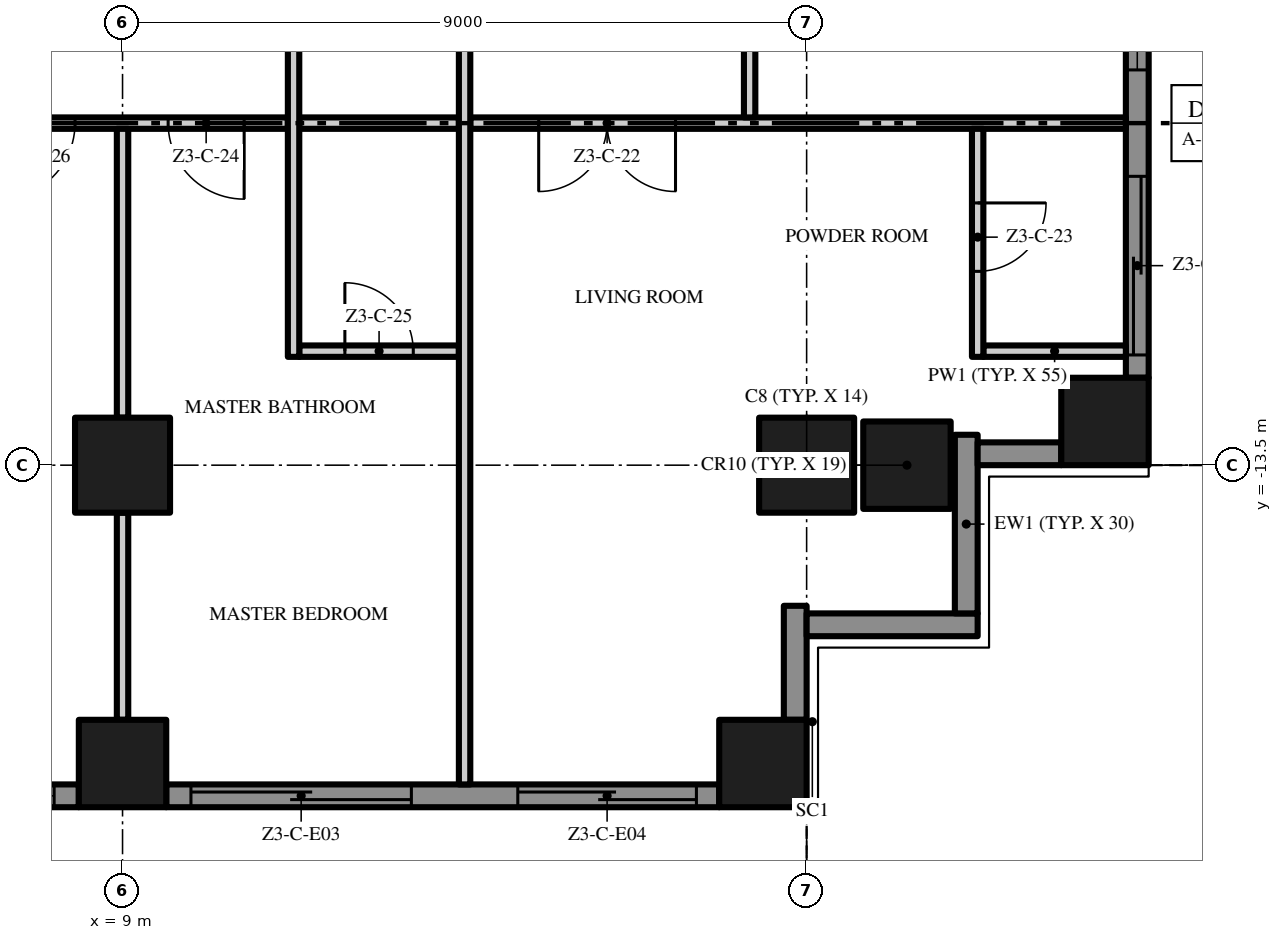
"""IFC4 building model, lengths in metres.
Left out: names, types, materials, properties, quantities, classifications, styles, units other than length and angle.
Written with IfcOpenShell. Run it as: python <this file> out.ifc"""

import sys

from ifc_helpers import new_model, si_unit, direction, frame, frame_2d, origin, origin_2d, place, context, subcontext, project, spatial, polyline, rectangle, outline, extrude, element, fill, save


model = new_model("IFC4")
c1 = context("Model", 3, precision=1e-05, world=origin(), true_north=direction((0.0, 1.0)))
c2 = subcontext(c1, "Body", "Model", "MODEL_VIEW")
j1 = project(units=[si_unit("LENGTHUNIT", "METRE"), si_unit("PLANEANGLEUNIT", "RADIAN")], contexts=[c1])
p1 = place(None, origin())
s1 = spatial("IfcSite", under=j1, at=p1, CompositionType="ELEMENT")
p2 = place(p1, origin())
s2 = spatial("IfcBuilding", under=s1, at=p2, CompositionType="ELEMENT")
p3 = place(p2, frame((0.0, 0.0, 147.8)))
s3 = spatial("IfcBuildingStorey", under=s2, at=p3, CompositionType="ELEMENT", Elevation=147.8)
p4 = place(p3, frame((18.0, -13.5, 0.0), z_axis=(0.0, 0.0, 1.0), x_axis=(1.0, 0.0, 0.0)))
e1 = element("IfcColumn", 1, at=p4, inside=s3, PredefinedType="COLUMN", context=c2, shape_type="SweptSolid", body=[
    extrude(rectangle(XDim=1.25, YDim=1.25, at=origin_2d()), origin(), (0.0, 0.0, 1.0), 3.5),
])
for number, where, z_axis, x_axis in (
    (2, (17.425, -17.425, 0.0), (0.0, 0.0, 1.0), (1.0, 0.0, 0.0)),
    (3, (21.925, -12.925, 0.0), (0.0, 0.0, 1.0), (1.0, 0.0, 0.0)),
    (4, (19.32, -13.5, 0.0), (0.0, 0.0, 1.0), (1.0, 0.0, 0.0)),
):
    element("IfcColumn", number, at=place(p3, frame(where, z_axis=z_axis, x_axis=x_axis)), inside=s3, PredefinedType="COLUMN", context=c2, shape_type="SweptSolid", body=[
        extrude(rectangle(XDim=1.15, YDim=1.15, at=origin_2d()), origin(), (0.0, 0.0, 1.0), 3.5),
    ])
p5 = place(p3, frame((9.0, -13.5, 0.0), z_axis=(0.0, 0.0, 1.0), x_axis=(1.0, 0.0, 0.0)))
e5 = element("IfcColumn", 5, at=p5, inside=s3, PredefinedType="COLUMN", context=c2, shape_type="SweptSolid", body=[
    extrude(rectangle(XDim=1.25, YDim=1.25, at=origin_2d()), origin(), (0.0, 0.0, 1.0), 3.5),
])
p6 = place(p3, frame((9.0, -17.425, 0.0), z_axis=(0.0, 0.0, 1.0), x_axis=(1.0, 0.0, 0.0)))
e6 = element("IfcColumn", 6, at=p6, inside=s3, PredefinedType="COLUMN", context=c2, shape_type="SweptSolid", body=[
    extrude(rectangle(XDim=1.15, YDim=1.15, at=origin_2d()), origin(), (0.0, 0.0, 1.0), 3.5),
])
p7 = place(p3, frame((8.425, -17.85, 0.0), z_axis=(0.0, 0.0, 1.0), x_axis=(-1.0, 0.0, 0.0)))
e7 = element("IfcWall", 7, at=p7, inside=s3, PredefinedType="SOLIDWALL", context=c2, shape_type="SweptSolid", body=[
    extrude(rectangle(XDim=7.85, YDim=0.3, at=frame_2d((3.925, 0.0))), origin(), (0.0, 0.0, 1.0), 3.5),
])
p8 = place(p7, frame((4.625, 0.0, 0.45)))
e8 = element("IfcOpeningElement", 8, at=p8, cuts=e7, PredefinedType="OPENING", context=c2, shape_type="SweptSolid", body=[
    extrude(rectangle(XDim=2.9, YDim=2.65, at=frame_2d((1.45, 1.325))), frame((0.0, 0.16, 0.0), z_axis=(0.0, -1.0, 0.0), x_axis=(1.0, 0.0, 0.0)), (0.0, 0.0, 1.0), 0.32),
])
p9 = place(p7, frame((0.325, 0.0, 0.45)))
e9 = element("IfcOpeningElement", 9, at=p9, cuts=e7, PredefinedType="OPENING", context=c2, shape_type="SweptSolid", body=[
    extrude(rectangle(XDim=2.9, YDim=2.65, at=frame_2d((1.45, 1.325))), frame((0.0, 0.16, 0.0), z_axis=(0.0, -1.0, 0.0), x_axis=(1.0, 0.0, 0.0)), (0.0, 0.0, 1.0), 0.32),
])
p10 = place(p3, frame((16.85, -17.85, 0.0), z_axis=(0.0, 0.0, 1.0), x_axis=(-1.0, 0.0, 0.0)))
e10 = element("IfcWall", 10, at=p10, inside=s3, PredefinedType="SOLIDWALL", context=c2, shape_type="SweptSolid", body=[
    extrude(rectangle(XDim=7.275, YDim=0.3, at=frame_2d((3.638, 0.0))), origin(), (0.0, 0.0, 1.0), 3.5),
])
p11 = place(p10, frame((4.05, 0.0, 0.0)))
e11 = element("IfcOpeningElement", 11, at=p11, cuts=e10, PredefinedType="OPENING", context=c2, shape_type="SweptSolid", body=[
    extrude(rectangle(XDim=2.9, YDim=2.4, at=frame_2d((1.45, 1.2))), frame((0.0, 0.16, 0.0), z_axis=(0.0, -1.0, 0.0), x_axis=(1.0, 0.0, 0.0)), (0.0, 0.0, 1.0), 0.32),
])
p12 = place(p10, frame((0.3, 0.0, 0.0)))
e12 = element("IfcOpeningElement", 12, at=p12, cuts=e10, PredefinedType="OPENING", context=c2, shape_type="SweptSolid", body=[
    extrude(rectangle(XDim=2.35, YDim=2.4, at=frame_2d((1.175, 1.2))), frame((0.0, 0.16, 0.0), z_axis=(0.0, -1.0, 0.0), x_axis=(1.0, 0.0, 0.0)), (0.0, 0.0, 1.0), 0.32),
])
p13 = place(p3, frame((17.85, -15.35, 0.0), z_axis=(0.0, 0.0, 1.0), x_axis=(0.0, -1.0, 0.0)))
e13 = element("IfcWall", 13, at=p13, inside=s3, PredefinedType="SOLIDWALL", context=c2, shape_type="SweptSolid", body=[
    extrude(rectangle(XDim=1.5, YDim=0.3, at=frame_2d((0.75, 0.0))), origin(), (0.0, 0.0, 1.0), 3.5),
])
p14 = place(p3, frame((20.25, -15.6, 0.0), z_axis=(0.0, 0.0, 1.0), x_axis=(-1.0, 0.0, 0.0)))
e14 = element("IfcWall", 14, at=p14, inside=s3, PredefinedType="SOLIDWALL", context=c2, shape_type="SweptSolid", body=[
    extrude(rectangle(XDim=2.25, YDim=0.3, at=frame_2d((1.125, 0.0))), origin(), (0.0, 0.0, 1.0), 3.5),
])
p15 = place(p3, frame((20.1, -13.1, 0.0), z_axis=(0.0, 0.0, 1.0), x_axis=(0.0, -1.0, 0.0)))
e15 = element("IfcWall", 15, at=p15, inside=s3, PredefinedType="SOLIDWALL", context=c2, shape_type="SweptSolid", body=[
    extrude(rectangle(XDim=2.35, YDim=0.3, at=frame_2d((1.175, 0.0))), origin(), (0.0, 0.0, 1.0), 3.5),
])
p16 = place(p3, frame((21.35, -13.35, 0.0), z_axis=(0.0, 0.0, 1.0), x_axis=(-1.0, 0.0, 0.0)))
e16 = element("IfcWall", 16, at=p16, inside=s3, PredefinedType="SOLIDWALL", context=c2, shape_type="SweptSolid", body=[
    extrude(rectangle(XDim=1.1, YDim=0.3, at=frame_2d((0.55, 0.0))), origin(), (0.0, 0.0, 1.0), 3.5),
])
p17 = place(p3, frame((22.35, -5.075, 0.0), z_axis=(0.0, 0.0, 1.0), x_axis=(0.0, -1.0, 0.0)))
e17 = element("IfcWall", 17, at=p17, inside=s3, PredefinedType="SOLIDWALL", context=c2, shape_type="SweptSolid", body=[
    extrude(rectangle(XDim=7.275, YDim=0.3, at=frame_2d((3.638, 0.0))), origin(), (0.0, 0.0, 1.0), 3.5),
])
p18 = place(p17, frame((4.625, 0.0, 0.0)))
e18 = element("IfcOpeningElement", 18, at=p18, cuts=e17, PredefinedType="OPENING", context=c2, shape_type="SweptSolid", body=[
    extrude(rectangle(XDim=2.35, YDim=2.4, at=frame_2d((1.175, 1.2))), frame((0.0, 0.16, 0.0), z_axis=(0.0, -1.0, 0.0), x_axis=(1.0, 0.0, 0.0)), (0.0, 0.0, 1.0), 0.32),
])
p19 = place(p17, frame((0.325, 0.0, 0.45)))
e19 = element("IfcOpeningElement", 19, at=p19, cuts=e17, PredefinedType="OPENING", context=c2, shape_type="SweptSolid", body=[
    extrude(rectangle(XDim=2.9, YDim=2.65, at=frame_2d((1.45, 1.325))), frame((0.0, 0.16, 0.0), z_axis=(0.0, -1.0, 0.0), x_axis=(1.0, 0.0, 0.0)), (0.0, 0.0, 1.0), 0.32),
])
p20 = place(p3, origin())
e20 = element("IfcWall", 20, at=p20, inside=s3, PredefinedType="USERDEFINED", context=c2, shape_type="SweptSolid", body=[
    extrude(outline(polyline([(-18.0, -20.649), (-16.5, -20.985), (-16.125, -21.0), (-15.0, -20.869), (-13.5, -20.345), (-12.0, -19.612), (-10.5, -18.951), (-9.0, -18.615), (-8.625, -18.6), (-7.5, -18.731), (-6.0, -19.255), (-4.5, -19.988), (-3.0, -20.649), (-1.5, -20.985), (-1.125, -21.0), (0.0, -20.869), (1.5, -20.345), (3.0, -19.612), (4.5, -18.951), (6.0, -18.615), (6.375, -18.6), (7.5, -18.731), (9.0, -19.255), (10.5, -19.988), (12.0, -20.649), (13.5, -20.985), (13.875, -21.0), (15.0, -20.869), (16.5, -20.345), (18.0, -19.612), (17.89, -19.388), (16.404, -20.114), (14.944, -20.624), (13.865, -20.749), (13.533, -20.736), (12.079, -20.41), (10.605, -19.761), (9.096, -19.024), (7.556, -18.486), (6.385, -18.349), (5.967, -18.366), (4.421, -18.713), (2.895, -19.385), (1.404, -20.114), (-0.056, -20.624), (-1.135, -20.749), (-1.467, -20.736), (-2.921, -20.41), (-4.395, -19.761), (-5.904, -19.024), (-7.444, -18.486), (-8.615, -18.349), (-9.033, -18.366), (-10.579, -18.713), (-12.105, -19.385), (-13.596, -20.114), (-15.056, -20.624), (-16.135, -20.749), (-16.467, -20.736), (-17.945, -20.405), (-18.0, -20.649)])), origin(), (0.0, 0.0, 1.0), 0.9),
])
p21 = place(p3, origin())
e21 = element("IfcWall", 21, at=p21, inside=s3, PredefinedType="USERDEFINED", context=c2, shape_type="SweptSolid", body=[
    extrude(outline(polyline([(25.149, -13.5), (25.485, -12.0), (25.5, -11.625), (25.369, -10.5), (24.845, -9.0), (24.112, -7.5), (23.451, -6.0), (23.115, -4.5), (23.1, -4.125), (23.231, -3.0), (23.755, -1.5), (24.488, 0.0), (25.149, 1.5), (25.485, 3.0), (25.5, 3.375), (25.369, 4.5), (24.845, 6.0), (24.112, 7.5), (23.451, 9.0), (23.115, 10.5), (23.1, 10.875), (23.231, 12.0), (23.755, 13.5), (24.488, 15.0), (25.149, 16.5), (25.485, 18.0), (25.241, 18.055), (24.91, 16.579), (24.261, 15.105), (23.524, 13.596), (22.986, 12.056), (22.849, 10.885), (22.866, 10.467), (23.213, 8.921), (23.885, 7.395), (24.614, 5.904), (25.124, 4.444), (25.249, 3.365), (25.236, 3.033), (24.91, 1.579), (24.261, 0.105), (23.524, -1.404), (22.986, -2.944), (22.849, -4.115), (22.866, -4.533), (23.213, -6.079), (23.885, -7.605), (24.614, -9.096), (25.124, -10.556), (25.249, -11.635), (25.236, -11.967), (24.905, -13.445), (25.149, -13.5)])), origin(), (0.0, 0.0, 1.0), 0.9),
])
p22 = place(p3, frame((11.325, -12.0, 0.0), z_axis=(0.0, 0.0, 1.0), x_axis=(1.0, 0.0, 0.0)))
e22 = element("IfcWall", 22, at=p22, inside=s3, PredefinedType="PARTITIONING", context=c2, shape_type="SweptSolid", body=[
    extrude(rectangle(XDim=2.1, YDim=0.15, at=frame_2d((1.05, 0.0))), origin(), (0.0, 0.0, 1.0), 3.5),
])
p23 = place(p22, frame((0.6, 0.0, 0.0)))
e23 = element("IfcOpeningElement", 23, at=p23, cuts=e22, PredefinedType="OPENING", context=c2, shape_type="SweptSolid", body=[
    extrude(rectangle(XDim=0.9, YDim=2.1, at=frame_2d((0.45, 1.05))), frame((0.0, 0.085, 0.0), z_axis=(0.0, -1.0, 0.0), x_axis=(1.0, 0.0, 0.0)), (0.0, 0.0, 1.0), 0.17),
])
p24 = place(p3, frame((20.325, -12.0, 0.0), z_axis=(0.0, 0.0, 1.0), x_axis=(1.0, 0.0, 0.0)))
e24 = element("IfcWall", 24, at=p24, inside=s3, PredefinedType="PARTITIONING", context=c2, shape_type="SweptSolid", body=[
    extrude(rectangle(XDim=1.875, YDim=0.15, at=frame_2d((0.938, 0.0))), origin(), (0.0, 0.0, 1.0), 3.5),
])
p25 = place(p3, frame((11.175, -9.0, 0.0), z_axis=(0.0, 0.0, 1.0), x_axis=(-1.0, 0.0, 0.0)))
e25 = element("IfcWall", 25, at=p25, inside=s3, PredefinedType="PARTITIONING", context=c2, shape_type="SweptSolid", body=[
    extrude(rectangle(XDim=4.35, YDim=0.15, at=frame_2d((2.175, 0.0))), origin(), (0.0, 0.0, 1.0), 3.5),
])
p26 = place(p25, frame((0.575, 0.0, 0.0)))
e26 = element("IfcOpeningElement", 26, at=p26, cuts=e25, PredefinedType="OPENING", context=c2, shape_type="SweptSolid", body=[
    extrude(rectangle(XDim=1.0, YDim=2.4, at=frame_2d((0.5, 1.2))), frame((0.0, 0.085, 0.0), z_axis=(0.0, -1.0, 0.0), x_axis=(1.0, 0.0, 0.0)), (0.0, 0.0, 1.0), 0.17),
])
p27 = place(p25, frame((2.8, 0.0, 0.0)))
e27 = element("IfcOpeningElement", 27, at=p27, cuts=e25, PredefinedType="OPENING", context=c2, shape_type="SweptSolid", body=[
    extrude(rectangle(XDim=1.0, YDim=2.4, at=frame_2d((0.5, 1.2))), frame((0.0, 0.085, 0.0), z_axis=(0.0, -1.0, 0.0), x_axis=(1.0, 0.0, 0.0)), (0.0, 0.0, 1.0), 0.17),
])
p28 = place(p3, frame((11.325, -9.0, 0.0), z_axis=(0.0, 0.0, 1.0), x_axis=(1.0, 0.0, 0.0)))
e28 = element("IfcWall", 28, at=p28, inside=s3, PredefinedType="PARTITIONING", context=c2, shape_type="SweptSolid", body=[
    extrude(rectangle(XDim=2.1, YDim=0.15, at=frame_2d((1.05, 0.0))), origin(), (0.0, 0.0, 1.0), 3.5),
])
p29 = place(p3, frame((22.2, -9.0, 0.0), z_axis=(0.0, 0.0, 1.0), x_axis=(-1.0, 0.0, 0.0)))
e29 = element("IfcWall", 29, at=p29, inside=s3, PredefinedType="PARTITIONING", context=c2, shape_type="SweptSolid", body=[
    extrude(rectangle(XDim=8.625, YDim=0.15, at=frame_2d((4.312, 0.0))), origin(), (0.0, 0.0, 1.0), 3.5),
])
p30 = place(p29, frame((5.925, 0.0, 0.0)))
e30 = element("IfcOpeningElement", 30, at=p30, cuts=e29, PredefinedType="OPENING", context=c2, shape_type="SweptSolid", body=[
    extrude(rectangle(XDim=1.8, YDim=2.4, at=frame_2d((0.9, 1.2))), frame((0.0, 0.085, 0.0), z_axis=(0.0, -1.0, 0.0), x_axis=(1.0, 0.0, 0.0)), (0.0, 0.0, 1.0), 0.17),
])
p31 = place(p3, frame((9.0, -16.85, 0.0), z_axis=(0.0, 0.0, 1.0), x_axis=(0.0, 1.0, 0.0)))
e31 = element("IfcWall", 31, at=p31, inside=s3, PredefinedType="PARTITIONING", context=c2, shape_type="SweptSolid", body=[
    extrude(rectangle(XDim=2.725, YDim=0.15, at=frame_2d((1.363, 0.0))), origin(), (0.0, 0.0, 1.0), 3.5),
])
p32 = place(p3, frame((9.0, -12.875, 0.0), z_axis=(0.0, 0.0, 1.0), x_axis=(0.0, 1.0, 0.0)))
e32 = element("IfcWall", 32, at=p32, inside=s3, PredefinedType="PARTITIONING", context=c2, shape_type="SweptSolid", body=[
    extrude(rectangle(XDim=3.8, YDim=0.15, at=frame_2d((1.9, 0.0))), origin(), (0.0, 0.0, 1.0), 3.5),
])
p33 = place(p3, frame((11.25, -12.075, 0.0), z_axis=(0.0, 0.0, 1.0), x_axis=(0.0, 1.0, 0.0)))
e33 = element("IfcWall", 33, at=p33, inside=s3, PredefinedType="PARTITIONING", context=c2, shape_type="SweptSolid", body=[
    extrude(rectangle(XDim=7.65, YDim=0.15, at=frame_2d((3.825, 0.0))), origin(), (0.0, 0.0, 1.0), 3.5),
])
p34 = place(p3, frame((13.5, -17.7, 0.0), z_axis=(0.0, 0.0, 1.0), x_axis=(0.0, 1.0, 0.0)))
e34 = element("IfcWall", 34, at=p34, inside=s3, PredefinedType="PARTITIONING", context=c2, shape_type="SweptSolid", body=[
    extrude(rectangle(XDim=13.275, YDim=0.15, at=frame_2d((6.638, 0.0))), origin(), (0.0, 0.0, 1.0), 3.5),
])
p35 = place(p34, frame((10.5, 0.0, 0.0)))
e35 = element("IfcOpeningElement", 35, at=p35, cuts=e34, PredefinedType="OPENING", context=c2, shape_type="SweptSolid", body=[
    extrude(rectangle(XDim=0.9, YDim=2.1, at=frame_2d((0.45, 1.05))), frame((0.0, 0.085, 0.0), z_axis=(0.0, -1.0, 0.0), x_axis=(1.0, 0.0, 0.0)), (0.0, 0.0, 1.0), 0.17),
])
p36 = place(p3, frame((17.25, -8.925, 0.0), z_axis=(0.0, 0.0, 1.0), x_axis=(0.0, 1.0, 0.0)))
e36 = element("IfcWall", 36, at=p36, inside=s3, PredefinedType="PARTITIONING", context=c2, shape_type="SweptSolid", body=[
    extrude(rectangle(XDim=4.5, YDim=0.15, at=frame_2d((2.25, 0.0))), origin(), (0.0, 0.0, 1.0), 3.5),
])
p37 = place(p3, frame((20.25, -9.075, 0.0), z_axis=(0.0, 0.0, 1.0), x_axis=(0.0, -1.0, 0.0)))
e37 = element("IfcWall", 37, at=p37, inside=s3, PredefinedType="PARTITIONING", context=c2, shape_type="SweptSolid", body=[
    extrude(rectangle(XDim=3.0, YDim=0.15, at=frame_2d((1.5, 0.0))), origin(), (0.0, 0.0, 1.0), 3.5),
])
p38 = place(p37, frame((0.975, 0.0, 0.0)))
e38 = element("IfcOpeningElement", 38, at=p38, cuts=e37, PredefinedType="OPENING", context=c2, shape_type="SweptSolid", body=[
    extrude(rectangle(XDim=0.9, YDim=2.1, at=frame_2d((0.45, 1.05))), frame((0.0, 0.085, 0.0), z_axis=(0.0, -1.0, 0.0), x_axis=(1.0, 0.0, 0.0)), (0.0, 0.0, 1.0), 0.17),
])
p39 = place(p9, origin())
e39 = element("IfcWindow", 39, at=p39, inside=s3, PartitioningType="SINGLE_PANEL", PredefinedType="WINDOW", context=c2, shape_type="SweptSolid", body=[
    extrude(rectangle(XDim=2.9, YDim=2.65, at=frame_2d((1.45, 1.325))), frame((0.0, 0.03, 0.0), z_axis=(0.0, -1.0, 0.0), x_axis=(1.0, 0.0, 0.0)), (0.0, 0.0, 1.0), 0.06),
])
fill(e9, e39)
p40 = place(p11, origin())
e40 = element("IfcDoor", 40, at=p40, inside=s3, OperationType="SINGLE_SWING_LEFT", PredefinedType="DOOR", context=c2, shape_type="SweptSolid", body=[
    extrude(rectangle(XDim=2.9, YDim=2.4, at=frame_2d((1.45, 1.2))), frame((0.0, 0.025, 0.0), z_axis=(0.0, -1.0, 0.0), x_axis=(1.0, 0.0, 0.0)), (0.0, 0.0, 1.0), 0.05),
])
fill(e11, e40)
p41 = place(p12, origin())
e41 = element("IfcDoor", 41, at=p41, inside=s3, OperationType="SINGLE_SWING_LEFT", PredefinedType="DOOR", context=c2, shape_type="SweptSolid", body=[
    extrude(rectangle(XDim=2.35, YDim=2.4, at=frame_2d((1.175, 1.2))), frame((0.0, 0.025, 0.0), z_axis=(0.0, -1.0, 0.0), x_axis=(1.0, 0.0, 0.0)), (0.0, 0.0, 1.0), 0.05),
])
fill(e12, e41)
p42 = place(p18, origin())
e42 = element("IfcDoor", 42, at=p42, inside=s3, OperationType="SINGLE_SWING_LEFT", PredefinedType="DOOR", context=c2, shape_type="SweptSolid", body=[
    extrude(rectangle(XDim=2.35, YDim=2.4, at=frame_2d((1.175, 1.2))), frame((0.0, 0.025, 0.0), z_axis=(0.0, -1.0, 0.0), x_axis=(1.0, 0.0, 0.0)), (0.0, 0.0, 1.0), 0.05),
])
fill(e18, e42)
p43 = place(p19, origin())
e43 = element("IfcWindow", 43, at=p43, inside=s3, PartitioningType="SINGLE_PANEL", PredefinedType="WINDOW", context=c2, shape_type="SweptSolid", body=[
    extrude(rectangle(XDim=2.9, YDim=2.65, at=frame_2d((1.45, 1.325))), frame((0.0, 0.03, 0.0), z_axis=(0.0, -1.0, 0.0), x_axis=(1.0, 0.0, 0.0)), (0.0, 0.0, 1.0), 0.06),
])
fill(e19, e43)
p44 = place(p30, origin())
e44 = element("IfcDoor", 44, at=p44, inside=s3, OperationType="DOUBLE_DOOR_SINGLE_SWING", PredefinedType="DOOR", context=c2, shape_type="SweptSolid", body=[
    extrude(rectangle(XDim=1.8, YDim=2.4, at=frame_2d((0.9, 1.2))), frame((0.0, 0.025, 0.0), z_axis=(0.0, -1.0, 0.0), x_axis=(1.0, 0.0, 0.0)), (0.0, 0.0, 1.0), 0.05),
])
fill(e30, e44)
p45 = place(p38, origin())
e45 = element("IfcDoor", 45, at=p45, inside=s3, OperationType="SINGLE_SWING_LEFT", PredefinedType="DOOR", context=c2, shape_type="SweptSolid", body=[
    extrude(rectangle(XDim=0.9, YDim=2.1, at=frame_2d((0.45, 1.05))), frame((0.0, 0.025, 0.0), z_axis=(0.0, -1.0, 0.0), x_axis=(1.0, 0.0, 0.0)), (0.0, 0.0, 1.0), 0.05),
])
fill(e38, e45)
p46 = place(p26, origin())
e46 = element("IfcDoor", 46, at=p46, inside=s3, OperationType="SINGLE_SWING_LEFT", PredefinedType="DOOR", context=c2, shape_type="SweptSolid", body=[
    extrude(rectangle(XDim=1.0, YDim=2.4, at=frame_2d((0.5, 1.2))), frame((0.0, 0.025, 0.0), z_axis=(0.0, -1.0, 0.0), x_axis=(1.0, 0.0, 0.0)), (0.0, 0.0, 1.0), 0.05),
])
fill(e26, e46)
p47 = place(p23, origin())
e47 = element("IfcDoor", 47, at=p47, inside=s3, OperationType="SINGLE_SWING_LEFT", PredefinedType="DOOR", context=c2, shape_type="SweptSolid", body=[
    extrude(rectangle(XDim=0.9, YDim=2.1, at=frame_2d((0.45, 1.05))), frame((0.0, 0.025, 0.0), z_axis=(0.0, -1.0, 0.0), x_axis=(1.0, 0.0, 0.0)), (0.0, 0.0, 1.0), 0.05),
])
fill(e23, e47)
p48 = place(p27, origin())
e48 = element("IfcDoor", 48, at=p48, inside=s3, OperationType="SINGLE_SWING_RIGHT", PredefinedType="DOOR", context=c2, shape_type="SweptSolid", body=[
    extrude(rectangle(XDim=1.0, YDim=2.4, at=frame_2d((0.5, 1.2))), frame((0.0, 0.025, 0.0), z_axis=(0.0, -1.0, 0.0), x_axis=(1.0, 0.0, 0.0)), (0.0, 0.0, 1.0), 0.05),
])
fill(e27, e48)
save(model, sys.argv[1])
